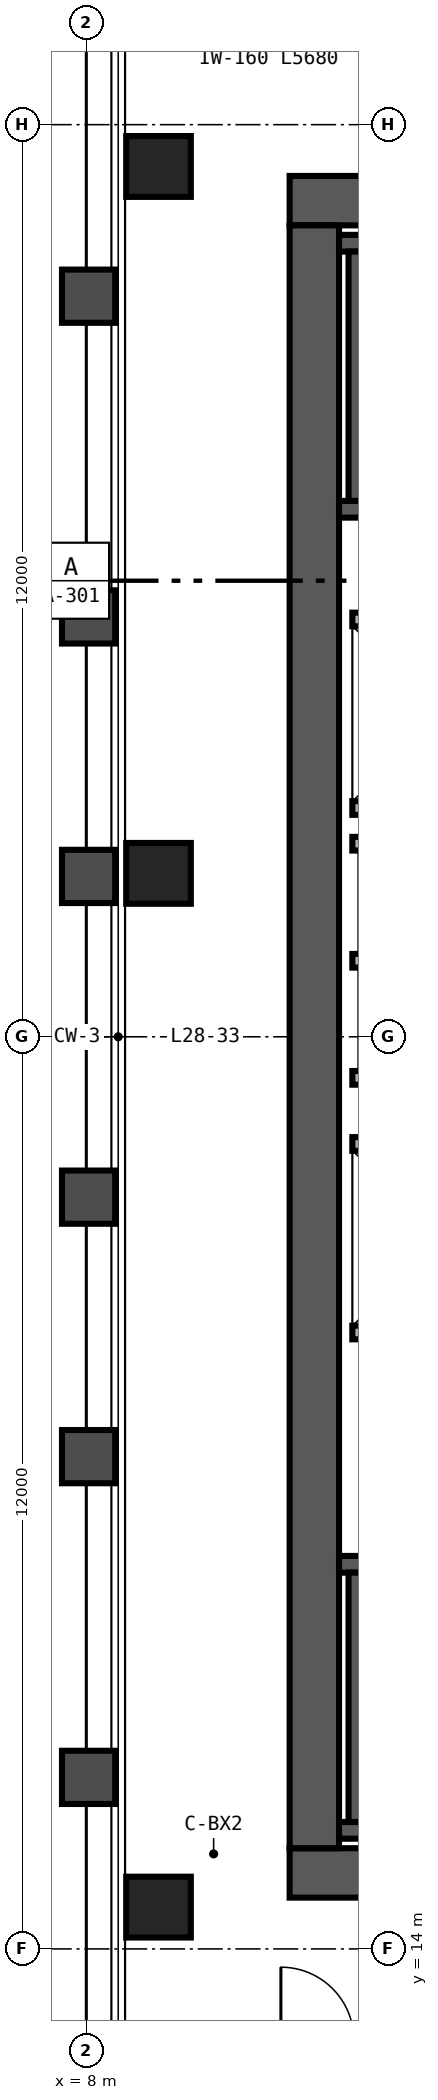
"""IFC4 building model, lengths in metres.
Left out: names, types, materials, properties, quantities, classifications, styles, units other than length and angle.
Written with IfcOpenShell. Run it as: python <this file> out.ifc"""

import sys

from ifc_helpers import new_model, si_unit, direction, frame, frame_2d, origin, origin_2d, place, context, subcontext, project, spatial, rectangle, hollow_rectangle, extrude, source, transform, mapped, element, save


model = new_model("IFC4")
c1 = context("Model", 3, precision=1e-05, world=origin(), true_north=direction((0.0, 1.0)))
c2 = subcontext(c1, "Body", "Model", "MODEL_VIEW")
j1 = project(units=[si_unit("LENGTHUNIT", "METRE"), si_unit("PLANEANGLEUNIT", "RADIAN")], contexts=[c1])
p1 = place(None, origin())
s1 = spatial("IfcSite", under=j1, at=p1, CompositionType="ELEMENT")
p2 = place(p1, origin())
s2 = spatial("IfcBuilding", under=s1, at=p2, CompositionType="ELEMENT")
p3 = place(p2, frame((0.0, 0.0, 115.2)))
s3 = spatial("IfcBuildingStorey", under=s2, at=p3, CompositionType="ELEMENT", Elevation=115.2)
p4 = place(p3, frame((10.675, 15.0, 0.0), z_axis=(0.0, 0.0, 1.0), x_axis=(1.0, 0.0, 0.0)))
e1 = element("IfcWall", 1, at=p4, inside=s3, PredefinedType="SHEAR", context=c2, shape_type="SweptSolid", body=[
    extrude(rectangle(XDim=12.65, YDim=0.65, at=frame_2d((6.325, 0.0))), origin(), (0.0, 0.0, 1.0), 3.36),
])
p5 = place(p4, frame((8.905, 0.0, 0.0)))
e2 = element("IfcOpeningElement", 2, at=p5, cuts=e1, PredefinedType="OPENING", context=c2, shape_type="SweptSolid", body=[
    extrude(rectangle(XDim=1.0, YDim=2.15, at=frame_2d((0.5, 1.075))), frame((0.0, 0.335, 0.0), z_axis=(0.0, -1.0, 0.0), x_axis=(1.0, 0.0, 0.0)), (0.0, 0.0, 1.0), 0.67),
])
p6 = place(p3, frame((10.675, 37.0, 0.0), z_axis=(0.0, 0.0, 1.0), x_axis=(1.0, 0.0, 0.0)))
e3 = element("IfcWall", 3, at=p6, inside=s3, PredefinedType="SHEAR", context=c2, shape_type="SweptSolid", body=[
    extrude(rectangle(XDim=12.65, YDim=0.65, at=frame_2d((6.325, 0.0))), origin(), (0.0, 0.0, 1.0), 3.36),
])
p7 = place(p6, frame((8.905, 0.0, 0.0)))
e4 = element("IfcOpeningElement", 4, at=p7, cuts=e3, PredefinedType="OPENING", context=c2, shape_type="SweptSolid", body=[
    extrude(rectangle(XDim=1.0, YDim=2.15, at=frame_2d((0.5, 1.075))), frame((0.0, 0.335, 0.0), z_axis=(0.0, -1.0, 0.0), x_axis=(1.0, 0.0, 0.0)), (0.0, 0.0, 1.0), 0.67),
])
p8 = place(p3, frame((11.0, 15.325, 0.0), z_axis=(0.0, 0.0, 1.0), x_axis=(0.0, 1.0, 0.0)))
e5 = element("IfcWall", 5, at=p8, inside=s3, PredefinedType="SHEAR", context=c2, shape_type="SweptSolid", body=[
    extrude(rectangle(XDim=21.35, YDim=0.65, at=frame_2d((10.675, 0.0))), origin(), (0.0, 0.0, 1.0), 3.36),
])
p9 = place(p3, frame((11.325, 15.56, 0.0), z_axis=(0.0, 0.0, 1.0), x_axis=(1.0, 0.0, 0.0)))
e6 = element("IfcWall", 6, at=p9, inside=s3, PredefinedType="SHEAR", context=c2, shape_type="SweptSolid", body=[
    extrude(rectangle(XDim=7.985, YDim=0.22, at=frame_2d((3.993, 0.0))), origin(), (0.0, 0.0, 1.0), 3.4),
])
p10 = place(p3, frame((11.325, 19.06, 0.0), z_axis=(0.0, 0.0, 1.0), x_axis=(1.0, 0.0, 0.0)))
e7 = element("IfcWall", 7, at=p10, inside=s3, PredefinedType="SHEAR", context=c2, shape_type="SweptSolid", body=[
    extrude(rectangle(XDim=7.985, YDim=0.22, at=frame_2d((3.993, 0.0))), origin(), (0.0, 0.0, 1.0), 3.4),
])
p11 = place(p10, frame((0.595, 0.0, 0.0)))
e8 = element("IfcOpeningElement", 8, at=p11, cuts=e7, PredefinedType="OPENING", context=c2, shape_type="SweptSolid", body=[
    extrude(rectangle(XDim=1.05, YDim=2.15, at=frame_2d((0.525, 1.075))), frame((0.0, 0.12, 0.0), z_axis=(0.0, -1.0, 0.0), x_axis=(1.0, 0.0, 0.0)), (0.0, 0.0, 1.0), 0.24),
])
p12 = place(p3, frame((11.56, 15.67, 0.0), z_axis=(0.0, 0.0, 1.0), x_axis=(0.0, 1.0, 0.0)))
e9 = element("IfcWall", 9, at=p12, inside=s3, PredefinedType="SHEAR", context=c2, shape_type="SweptSolid", body=[
    extrude(rectangle(XDim=3.28, YDim=0.22, at=frame_2d((1.64, 0.0))), origin(), (0.0, 0.0, 1.0), 3.4),
])
p13 = place(p3, frame((11.325, 32.94, 0.0), z_axis=(0.0, 0.0, 1.0), x_axis=(1.0, 0.0, 0.0)))
e10 = element("IfcWall", 10, at=p13, inside=s3, PredefinedType="SHEAR", context=c2, shape_type="SweptSolid", body=[
    extrude(rectangle(XDim=7.985, YDim=0.22, at=frame_2d((3.993, 0.0))), origin(), (0.0, 0.0, 1.0), 3.4),
])
p14 = place(p13, frame((0.595, 0.0, 0.0)))
e11 = element("IfcOpeningElement", 11, at=p14, cuts=e10, PredefinedType="OPENING", context=c2, shape_type="SweptSolid", body=[
    extrude(rectangle(XDim=1.05, YDim=2.15, at=frame_2d((0.525, 1.075))), frame((0.0, 0.12, 0.0), z_axis=(0.0, -1.0, 0.0), x_axis=(1.0, 0.0, 0.0)), (0.0, 0.0, 1.0), 0.24),
])
p15 = place(p3, frame((11.325, 36.44, 0.0), z_axis=(0.0, 0.0, 1.0), x_axis=(1.0, 0.0, 0.0)))
e12 = element("IfcWall", 12, at=p15, inside=s3, PredefinedType="SHEAR", context=c2, shape_type="SweptSolid", body=[
    extrude(rectangle(XDim=7.985, YDim=0.22, at=frame_2d((3.993, 0.0))), origin(), (0.0, 0.0, 1.0), 3.4),
])
p16 = place(p3, frame((11.56, 33.05, 0.0), z_axis=(0.0, 0.0, 1.0), x_axis=(0.0, 1.0, 0.0)))
e13 = element("IfcWall", 13, at=p16, inside=s3, PredefinedType="SHEAR", context=c2, shape_type="SweptSolid", body=[
    extrude(rectangle(XDim=3.28, YDim=0.22, at=frame_2d((1.64, 0.0))), origin(), (0.0, 0.0, 1.0), 3.4),
])
m1 = source(origin(), c2, "Body", "SweptSolid", [
    extrude(hollow_rectangle(XDim=0.85, YDim=0.8, WallThickness=0.032, at=origin_2d()), origin(), (0.0, 0.0, 1.0), 3.36),
])
for number, where, z_axis, x_axis in (
    (14, (8.95, 14.55, 0.0), (0.0, 0.0, 1.0), (1.0, 0.0, 0.0)),
    (15, (8.95, 28.15, 0.0), (0.0, 0.0, 1.0), (1.0, 0.0, 0.0)),
    (16, (8.95, 37.45, 0.0), (0.0, 0.0, 1.0), (1.0, 0.0, 0.0)),
):
    element("IfcColumn", number, at=place(p3, frame(where, z_axis=z_axis, x_axis=x_axis)), inside=s3, PredefinedType="COLUMN", context=c2, shape_type="MappedRepresentation", body=[
        mapped(m1, transform((0.0, 0.0, 0.0), scale=1.0)),
    ])
for number, where, z_axis, x_axis in (
    (17, (11.5, 22.11, 0.0), (0.0, 0.0, 1.0), (1.0, 0.0, 0.0)),
    (18, (11.5, 24.59, 0.0), (0.0, 0.0, 1.0), (1.0, 0.0, 0.0)),
    (19, (11.5, 29.01, 0.0), (0.0, 0.0, 1.0), (1.0, 0.0, 0.0)),
    (20, (11.5, 31.49, 0.0), (0.0, 0.0, 1.0), (1.0, 0.0, 0.0)),
):
    element("IfcWall", number, at=place(p3, frame(where, z_axis=z_axis, x_axis=x_axis)), inside=s3, PredefinedType="SOLIDWALL", context=c2, shape_type="SweptSolid", body=[
        extrude(rectangle(XDim=2.5, YDim=0.18, at=frame_2d((1.25, 0.0))), origin(), (0.0, 0.0, 1.0), 3.36),
    ])
for number, where, z_axis, x_axis in (
    (21, (11.5, 25.46, 0.0), (0.0, 0.0, 1.0), (1.0, 0.0, 0.0)),
    (22, (11.5, 27.0, 0.0), (0.0, 0.0, 1.0), (1.0, 0.0, 0.0)),
    (23, (11.5, 28.54, 0.0), (0.0, 0.0, 1.0), (1.0, 0.0, 0.0)),
):
    element("IfcWall", number, at=place(p3, frame(where, z_axis=z_axis, x_axis=x_axis)), inside=s3, PredefinedType="SOLIDWALL", context=c2, shape_type="SweptSolid", body=[
        extrude(rectangle(XDim=2.51, YDim=0.18, at=frame_2d((1.255, 0.0))), origin(), (0.0, 0.0, 1.0), 3.36),
    ])
save(model, sys.argv[1])
